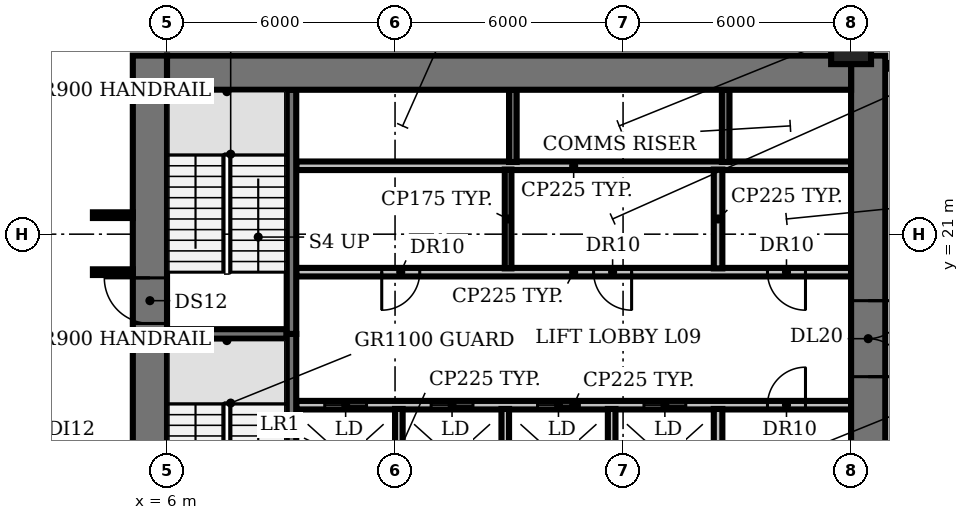
"""IFC4 building model, lengths in metres.
Left out: names, types, materials, properties, quantities, classifications, styles, units other than length and angle.
Written with IfcOpenShell. Run it as: python <this file> out.ifc"""

import sys

from ifc_helpers import new_model, si_unit, direction, frame, frame_2d, origin, origin_2d, place, context, subcontext, project, spatial, rectangle, circle, extrude, element, fill, save


model = new_model("IFC4")
c1 = context("Model", 3, precision=1e-05, world=origin(), true_north=direction((0.0, 1.0)))
c2 = subcontext(c1, "Body", "Model", "MODEL_VIEW")
j1 = project(units=[si_unit("LENGTHUNIT", "METRE"), si_unit("PLANEANGLEUNIT", "RADIAN")], contexts=[c1])
p1 = place(None, origin())
s1 = spatial("IfcSite", under=j1, at=p1, CompositionType="ELEMENT")
p2 = place(p1, origin())
s2 = spatial("IfcBuilding", under=s1, at=p2, CompositionType="ELEMENT")
p3 = place(p2, frame((0.0, 0.0, 41.6)))
s3 = spatial("IfcBuildingStorey", under=s2, at=p3, CompositionType="ELEMENT", Elevation=41.6)
p4 = place(p3, frame((24.0, 26.0, 0.0), z_axis=(0.0, 0.0, 1.0), x_axis=(1.0, 0.0, 0.0)))
e1 = element("IfcColumn", 1, at=p4, inside=s3, PredefinedType="COLUMN", context=c2, shape_type="SweptSolid", body=[
    extrude(circle(Radius=0.525, at=origin_2d()), origin(), (0.0, 0.0, 1.0), 3.85),
])
p5 = place(p3, frame((9.4, 16.5, 0.0), z_axis=(0.0, 0.0, 1.0), x_axis=(1.0, 0.0, 0.0)))
e2 = element("IfcWall", 2, at=p5, inside=s3, PredefinedType="PARTITIONING", context=c2, shape_type="SweptSolid", body=[
    extrude(rectangle(XDim=14.6, YDim=0.225, at=frame_2d((7.3, 0.0))), origin(), (0.0, 0.0, 1.0), 3.85),
])
p6 = place(p5, frame((0.75, 0.0, 0.0)))
e3 = element("IfcOpeningElement", 3, at=p6, cuts=e2, PredefinedType="OPENING", context=c2, shape_type="SweptSolid", body=[
    extrude(rectangle(XDim=1.1, YDim=2.1, at=frame_2d((0.55, 1.05))), frame((0.0, 0.123, 0.0), z_axis=(0.0, -1.0, 0.0), x_axis=(1.0, 0.0, 0.0)), (0.0, 0.0, 1.0), 0.245),
])
p7 = place(p5, frame((3.55, 0.0, 0.0)))
e4 = element("IfcOpeningElement", 4, at=p7, cuts=e2, PredefinedType="OPENING", context=c2, shape_type="SweptSolid", body=[
    extrude(rectangle(XDim=1.1, YDim=2.1, at=frame_2d((0.55, 1.05))), frame((0.0, 0.123, 0.0), z_axis=(0.0, -1.0, 0.0), x_axis=(1.0, 0.0, 0.0)), (0.0, 0.0, 1.0), 0.245),
])
p8 = place(p5, frame((6.35, 0.0, 0.0)))
e5 = element("IfcOpeningElement", 5, at=p8, cuts=e2, PredefinedType="OPENING", context=c2, shape_type="SweptSolid", body=[
    extrude(rectangle(XDim=1.1, YDim=2.1, at=frame_2d((0.55, 1.05))), frame((0.0, 0.123, 0.0), z_axis=(0.0, -1.0, 0.0), x_axis=(1.0, 0.0, 0.0)), (0.0, 0.0, 1.0), 0.245),
])
p9 = place(p5, frame((9.15, 0.0, 0.0)))
e6 = element("IfcOpeningElement", 6, at=p9, cuts=e2, PredefinedType="OPENING", context=c2, shape_type="SweptSolid", body=[
    extrude(rectangle(XDim=1.1, YDim=2.1, at=frame_2d((0.55, 1.05))), frame((0.0, 0.123, 0.0), z_axis=(0.0, -1.0, 0.0), x_axis=(1.0, 0.0, 0.0)), (0.0, 0.0, 1.0), 0.245),
])
p10 = place(p5, frame((12.4, 0.0, 0.0)))
e7 = element("IfcOpeningElement", 7, at=p10, cuts=e2, PredefinedType="OPENING", context=c2, shape_type="SweptSolid", body=[
    extrude(rectangle(XDim=1.0, YDim=2.1, at=frame_2d((0.5, 1.05))), frame((0.0, 0.123, 0.0), z_axis=(0.0, -1.0, 0.0), x_axis=(1.0, 0.0, 0.0)), (0.0, 0.0, 1.0), 0.245),
])
p11 = place(p3, frame((6.0, 18.375, 0.0), z_axis=(0.0, 0.0, 1.0), x_axis=(1.0, 0.0, 0.0)))
e8 = element("IfcWall", 8, at=p11, inside=s3, PredefinedType="SHEAR", context=c2, shape_type="SweptSolid", body=[
    extrude(rectangle(XDim=3.15, YDim=0.25, at=frame_2d((1.575, 0.0))), origin(), (0.0, 0.0, 1.0), 3.85),
])
p12 = place(p3, frame((24.0, 20.0, 0.0), z_axis=(0.0, 0.0, 1.0), x_axis=(-1.0, 0.0, 0.0)))
e9 = element("IfcWall", 9, at=p12, inside=s3, PredefinedType="PARTITIONING", context=c2, shape_type="SweptSolid", body=[
    extrude(rectangle(XDim=14.6, YDim=0.225, at=frame_2d((7.3, 0.0))), origin(), (0.0, 0.0, 1.0), 3.85),
])
p13 = place(p12, frame((11.35, 0.0, 0.0)))
e10 = element("IfcOpeningElement", 10, at=p13, cuts=e9, PredefinedType="OPENING", context=c2, shape_type="SweptSolid", body=[
    extrude(rectangle(XDim=1.0, YDim=2.1, at=frame_2d((0.5, 1.05))), frame((0.0, 0.123, 0.0), z_axis=(0.0, -1.0, 0.0), x_axis=(1.0, 0.0, 0.0)), (0.0, 0.0, 1.0), 0.245),
])
p14 = place(p12, frame((5.775, 0.0, 0.0)))
e11 = element("IfcOpeningElement", 11, at=p14, cuts=e9, PredefinedType="OPENING", context=c2, shape_type="SweptSolid", body=[
    extrude(rectangle(XDim=1.0, YDim=2.1, at=frame_2d((0.5, 1.05))), frame((0.0, 0.123, 0.0), z_axis=(0.0, -1.0, 0.0), x_axis=(1.0, 0.0, 0.0)), (0.0, 0.0, 1.0), 0.245),
])
p15 = place(p12, frame((1.2, 0.0, 0.0)))
e12 = element("IfcOpeningElement", 12, at=p15, cuts=e9, PredefinedType="OPENING", context=c2, shape_type="SweptSolid", body=[
    extrude(rectangle(XDim=1.0, YDim=2.1, at=frame_2d((0.5, 1.05))), frame((0.0, 0.123, 0.0), z_axis=(0.0, -1.0, 0.0), x_axis=(1.0, 0.0, 0.0)), (0.0, 0.0, 1.0), 0.245),
])
p16 = place(p3, frame((9.4, 22.8, 0.0), z_axis=(0.0, 0.0, 1.0), x_axis=(1.0, 0.0, 0.0)))
e13 = element("IfcWall", 13, at=p16, inside=s3, PredefinedType="PARTITIONING", context=c2, shape_type="SweptSolid", body=[
    extrude(rectangle(XDim=14.6, YDim=0.225, at=frame_2d((7.3, 0.0))), origin(), (0.0, 0.0, 1.0), 3.85),
])
p17 = place(p3, frame((9.275, 18.375, 0.0), z_axis=(0.0, 0.0, 1.0), x_axis=(0.0, -1.0, 0.0)))
e14 = element("IfcWall", 14, at=p17, inside=s3, PredefinedType="SHEAR", context=c2, shape_type="SweptSolid", body=[
    extrude(rectangle(XDim=6.55, YDim=0.25, at=frame_2d((3.275, 0.0))), origin(), (0.0, 0.0, 1.0), 3.85),
])
p18 = place(p17, frame((5.075, 0.0, 0.0)))
e15 = element("IfcOpeningElement", 15, at=p18, cuts=e14, PredefinedType="OPENING", context=c2, shape_type="SweptSolid", body=[
    extrude(rectangle(XDim=1.0, YDim=2.1, at=frame_2d((0.5, 1.05))), frame((0.0, 0.135, 0.0), z_axis=(0.0, -1.0, 0.0), x_axis=(1.0, 0.0, 0.0)), (0.0, 0.0, 1.0), 0.27),
])
p19 = place(p3, frame((9.275, 18.375, 0.0), z_axis=(0.0, 0.0, 1.0), x_axis=(0.0, 1.0, 0.0)))
e16 = element("IfcWall", 16, at=p19, inside=s3, PredefinedType="SHEAR", context=c2, shape_type="SweptSolid", body=[
    extrude(rectangle(XDim=6.425, YDim=0.25, at=frame_2d((3.212, 0.0))), origin(), (0.0, 0.0, 1.0), 3.85),
])
for number, where, z_axis, x_axis in (
    (17, (12.1, 13.8, 0.0), (0.0, 0.0, 1.0), (0.0, 1.0, 0.0)),
    (18, (14.9, 13.8, 0.0), (0.0, 0.0, 1.0), (0.0, 1.0, 0.0)),
):
    element("IfcWall", number, at=place(p3, frame(where, z_axis=z_axis, x_axis=x_axis)), inside=s3, PredefinedType="SOLIDWALL", context=c2, shape_type="SweptSolid", body=[
        extrude(rectangle(XDim=2.6, YDim=0.2, at=frame_2d((1.3, 0.0))), origin(), (0.0, 0.0, 1.0), 3.85),
    ])
p20 = place(p3, frame((14.975, 20.1, 0.0), z_axis=(0.0, 0.0, 1.0), x_axis=(0.0, 1.0, 0.0)))
e19 = element("IfcWall", 19, at=p20, inside=s3, PredefinedType="PARTITIONING", context=c2, shape_type="SweptSolid", body=[
    extrude(rectangle(XDim=2.6, YDim=0.175, at=frame_2d((1.3, 0.0))), origin(), (0.0, 0.0, 1.0), 3.85),
])
p21 = place(p3, frame((15.1, 22.9, 0.0), z_axis=(0.0, 0.0, 1.0), x_axis=(0.0, 1.0, 0.0)))
e20 = element("IfcWall", 20, at=p21, inside=s3, PredefinedType="SHEAR", context=c2, shape_type="SweptSolid", body=[
    extrude(rectangle(XDim=1.9, YDim=0.2, at=frame_2d((0.95, 0.0))), origin(), (0.0, 0.0, 1.0), 3.85),
])
p22 = place(p3, frame((17.7, 13.8, 0.0), z_axis=(0.0, 0.0, 1.0), x_axis=(0.0, 1.0, 0.0)))
e21 = element("IfcWall", 21, at=p22, inside=s3, PredefinedType="SOLIDWALL", context=c2, shape_type="SweptSolid", body=[
    extrude(rectangle(XDim=2.6, YDim=0.2, at=frame_2d((1.3, 0.0))), origin(), (0.0, 0.0, 1.0), 3.85),
])
for number, where, z_axis, x_axis in (
    (22, (20.5, 13.8, 0.0), (0.0, 0.0, 1.0), (0.0, 1.0, 0.0)),
    (23, (20.5, 20.1, 0.0), (0.0, 0.0, 1.0), (0.0, 1.0, 0.0)),
):
    element("IfcWall", number, at=place(p3, frame(where, z_axis=z_axis, x_axis=x_axis)), inside=s3, PredefinedType="PARTITIONING", context=c2, shape_type="SweptSolid", body=[
        extrude(rectangle(XDim=2.6, YDim=0.225, at=frame_2d((1.3, 0.0))), origin(), (0.0, 0.0, 1.0), 3.85),
    ])
p23 = place(p3, frame((20.7, 22.9, 0.0), z_axis=(0.0, 0.0, 1.0), x_axis=(0.0, 1.0, 0.0)))
e24 = element("IfcWall", 24, at=p23, inside=s3, PredefinedType="SHEAR", context=c2, shape_type="SweptSolid", body=[
    extrude(rectangle(XDim=1.9, YDim=0.2, at=frame_2d((0.95, 0.0))), origin(), (0.0, 0.0, 1.0), 3.85),
])
p24 = place(p3, frame((5.55, 4.5, 0.0), z_axis=(0.0, 0.0, 1.0), x_axis=(0.0, 1.0, 0.0)))
e25 = element("IfcWall", 25, at=p24, inside=s3, PredefinedType="SHEAR", context=c2, shape_type="SweptSolid", body=[
    extrude(rectangle(XDim=21.2, YDim=0.9, at=frame_2d((10.6, 0.0))), origin(), (0.0, 0.0, 1.0), 3.85),
])
p25 = place(p24, frame((1.15, 0.0, 0.0)))
e26 = element("IfcOpeningElement", 26, at=p25, cuts=e25, PredefinedType="OPENING", context=c2, shape_type="SweptSolid", body=[
    extrude(rectangle(XDim=1.5, YDim=2.1, at=frame_2d((0.75, 1.05))), frame((0.0, 0.46, 0.0), z_axis=(0.0, -1.0, 0.0), x_axis=(1.0, 0.0, 0.0)), (0.0, 0.0, 1.0), 0.92),
])
p26 = place(p24, frame((7.6, 0.0, 0.0)))
e27 = element("IfcOpeningElement", 27, at=p26, cuts=e25, PredefinedType="OPENING", context=c2, shape_type="SweptSolid", body=[
    extrude(rectangle(XDim=1.2, YDim=2.1, at=frame_2d((0.6, 1.05))), frame((0.0, 0.46, 0.0), z_axis=(0.0, -1.0, 0.0), x_axis=(1.0, 0.0, 0.0)), (0.0, 0.0, 1.0), 0.92),
])
p27 = place(p24, frame((14.15, 0.0, 0.0)))
e28 = element("IfcOpeningElement", 28, at=p27, cuts=e25, PredefinedType="OPENING", context=c2, shape_type="SweptSolid", body=[
    extrude(rectangle(XDim=1.2, YDim=2.1, at=frame_2d((0.6, 1.05))), frame((0.0, 0.46, 0.0), z_axis=(0.0, -1.0, 0.0), x_axis=(1.0, 0.0, 0.0)), (0.0, 0.0, 1.0), 0.92),
])
p28 = place(p3, frame((24.45, 25.7, 0.0), z_axis=(0.0, 0.0, 1.0), x_axis=(0.0, -1.0, 0.0)))
e29 = element("IfcWall", 29, at=p28, inside=s3, PredefinedType="SHEAR", context=c2, shape_type="SweptSolid", body=[
    extrude(rectangle(XDim=21.2, YDim=0.9, at=frame_2d((10.6, 0.0))), origin(), (0.0, 0.0, 1.0), 3.85),
])
p29 = place(p28, frame((18.55, 0.0, 0.0)))
e30 = element("IfcOpeningElement", 30, at=p29, cuts=e29, PredefinedType="OPENING", context=c2, shape_type="SweptSolid", body=[
    extrude(rectangle(XDim=1.5, YDim=2.1, at=frame_2d((0.75, 1.05))), frame((0.0, 0.46, 0.0), z_axis=(0.0, -1.0, 0.0), x_axis=(1.0, 0.0, 0.0)), (0.0, 0.0, 1.0), 0.92),
])
p30 = place(p28, frame((12.45, 0.0, 0.0)))
e31 = element("IfcOpeningElement", 31, at=p30, cuts=e29, PredefinedType="OPENING", context=c2, shape_type="SweptSolid", body=[
    extrude(rectangle(XDim=0.9, YDim=2.1, at=frame_2d((0.45, 1.05))), frame((0.0, 0.46, 0.0), z_axis=(0.0, -1.0, 0.0), x_axis=(1.0, 0.0, 0.0)), (0.0, 0.0, 1.0), 0.92),
])
p31 = place(p28, frame((6.45, 0.0, 0.0)))
e32 = element("IfcOpeningElement", 32, at=p31, cuts=e29, PredefinedType="OPENING", context=c2, shape_type="SweptSolid", body=[
    extrude(rectangle(XDim=2.0, YDim=2.1, at=frame_2d((1.0, 1.05))), frame((0.0, 0.46, 0.0), z_axis=(0.0, -1.0, 0.0), x_axis=(1.0, 0.0, 0.0)), (0.0, 0.0, 1.0), 0.92),
])
p32 = place(p3, frame((6.0, 25.25, 0.0), z_axis=(0.0, 0.0, 1.0), x_axis=(1.0, 0.0, 0.0)))
e33 = element("IfcWall", 33, at=p32, inside=s3, PredefinedType="SHEAR", context=c2, shape_type="SweptSolid", body=[
    extrude(rectangle(XDim=18.0, YDim=0.9, at=frame_2d((9.0, 0.0))), origin(), (0.0, 0.0, 1.0), 3.85),
])
for number, where, z_axis, x_axis in (
    (34, (4.05, 20.0, 0.0), (0.0, 0.0, 1.0), (1.0, 0.0, 0.0)),
    (35, (4.05, 21.5, 0.0), (0.0, 0.0, 1.0), (1.0, 0.0, 0.0)),
):
    element("IfcWall", number, at=place(p3, frame(where, z_axis=z_axis, x_axis=x_axis)), inside=s3, PredefinedType="PARTITIONING", context=c2, shape_type="SweptSolid", body=[
        extrude(rectangle(XDim=1.05, YDim=0.15, at=frame_2d((0.525, 0.0))), origin(), (0.0, 0.0, 1.0), 2.83),
    ])
p33 = place(p6, origin())
e36 = element("IfcDoor", 36, at=p33, inside=s3, OperationType="DOUBLE_DOOR_SLIDING", PredefinedType="DOOR", context=c2, shape_type="SweptSolid", body=[
    extrude(rectangle(XDim=1.1, YDim=2.1, at=frame_2d((0.55, 1.05))), frame((0.0, 0.025, 0.0), z_axis=(0.0, -1.0, 0.0), x_axis=(1.0, 0.0, 0.0)), (0.0, 0.0, 1.0), 0.05),
])
fill(e3, e36)
p34 = place(p7, origin())
e37 = element("IfcDoor", 37, at=p34, inside=s3, OperationType="DOUBLE_DOOR_SLIDING", PredefinedType="DOOR", context=c2, shape_type="SweptSolid", body=[
    extrude(rectangle(XDim=1.1, YDim=2.1, at=frame_2d((0.55, 1.05))), frame((0.0, 0.025, 0.0), z_axis=(0.0, -1.0, 0.0), x_axis=(1.0, 0.0, 0.0)), (0.0, 0.0, 1.0), 0.05),
])
fill(e4, e37)
p35 = place(p8, origin())
e38 = element("IfcDoor", 38, at=p35, inside=s3, OperationType="DOUBLE_DOOR_SLIDING", PredefinedType="DOOR", context=c2, shape_type="SweptSolid", body=[
    extrude(rectangle(XDim=1.1, YDim=2.1, at=frame_2d((0.55, 1.05))), frame((0.0, 0.025, 0.0), z_axis=(0.0, -1.0, 0.0), x_axis=(1.0, 0.0, 0.0)), (0.0, 0.0, 1.0), 0.05),
])
fill(e5, e38)
p36 = place(p9, origin())
e39 = element("IfcDoor", 39, at=p36, inside=s3, OperationType="DOUBLE_DOOR_SLIDING", PredefinedType="DOOR", context=c2, shape_type="SweptSolid", body=[
    extrude(rectangle(XDim=1.1, YDim=2.1, at=frame_2d((0.55, 1.05))), frame((0.0, 0.025, 0.0), z_axis=(0.0, -1.0, 0.0), x_axis=(1.0, 0.0, 0.0)), (0.0, 0.0, 1.0), 0.05),
])
fill(e6, e39)
p37 = place(p10, origin())
e40 = element("IfcDoor", 40, at=p37, inside=s3, OperationType="SINGLE_SWING_RIGHT", PredefinedType="DOOR", context=c2, shape_type="SweptSolid", body=[
    extrude(rectangle(XDim=1.0, YDim=2.1, at=frame_2d((0.5, 1.05))), frame((0.0, 0.025, 0.0), z_axis=(0.0, -1.0, 0.0), x_axis=(1.0, 0.0, 0.0)), (0.0, 0.0, 1.0), 0.05),
])
fill(e7, e40)
p38 = place(p13, origin())
e41 = element("IfcDoor", 41, at=p38, inside=s3, OperationType="SINGLE_SWING_RIGHT", PredefinedType="DOOR", context=c2, shape_type="SweptSolid", body=[
    extrude(rectangle(XDim=1.0, YDim=2.1, at=frame_2d((0.5, 1.05))), frame((0.0, 0.025, 0.0), z_axis=(0.0, -1.0, 0.0), x_axis=(1.0, 0.0, 0.0)), (0.0, 0.0, 1.0), 0.05),
])
fill(e10, e41)
p39 = place(p14, origin())
e42 = element("IfcDoor", 42, at=p39, inside=s3, OperationType="SINGLE_SWING_LEFT", PredefinedType="DOOR", context=c2, shape_type="SweptSolid", body=[
    extrude(rectangle(XDim=1.0, YDim=2.1, at=frame_2d((0.5, 1.05))), frame((0.0, 0.025, 0.0), z_axis=(0.0, -1.0, 0.0), x_axis=(1.0, 0.0, 0.0)), (0.0, 0.0, 1.0), 0.05),
])
fill(e11, e42)
p40 = place(p15, origin())
e43 = element("IfcDoor", 43, at=p40, inside=s3, OperationType="SINGLE_SWING_LEFT", PredefinedType="DOOR", context=c2, shape_type="SweptSolid", body=[
    extrude(rectangle(XDim=1.0, YDim=2.1, at=frame_2d((0.5, 1.05))), frame((0.0, 0.025, 0.0), z_axis=(0.0, -1.0, 0.0), x_axis=(1.0, 0.0, 0.0)), (0.0, 0.0, 1.0), 0.05),
])
fill(e12, e43)
p41 = place(p27, origin())
e44 = element("IfcDoor", 44, at=p41, inside=s3, OperationType="SINGLE_SWING_RIGHT", PredefinedType="DOOR", context=c2, shape_type="SweptSolid", body=[
    extrude(rectangle(XDim=1.2, YDim=2.1, at=frame_2d((0.6, 1.05))), frame((0.0, 0.025, 0.0), z_axis=(0.0, -1.0, 0.0), x_axis=(1.0, 0.0, 0.0)), (0.0, 0.0, 1.0), 0.05),
])
fill(e28, e44)
p42 = place(p31, origin())
e45 = element("IfcDoor", 45, at=p42, inside=s3, OperationType="DOUBLE_DOOR_SINGLE_SWING", PredefinedType="DOOR", context=c2, shape_type="SweptSolid", body=[
    extrude(rectangle(XDim=2.0, YDim=2.1, at=frame_2d((1.0, 1.05))), frame((0.0, 0.025, 0.0), z_axis=(0.0, -1.0, 0.0), x_axis=(1.0, 0.0, 0.0)), (0.0, 0.0, 1.0), 0.05),
])
fill(e32, e45)
save(model, sys.argv[1])
